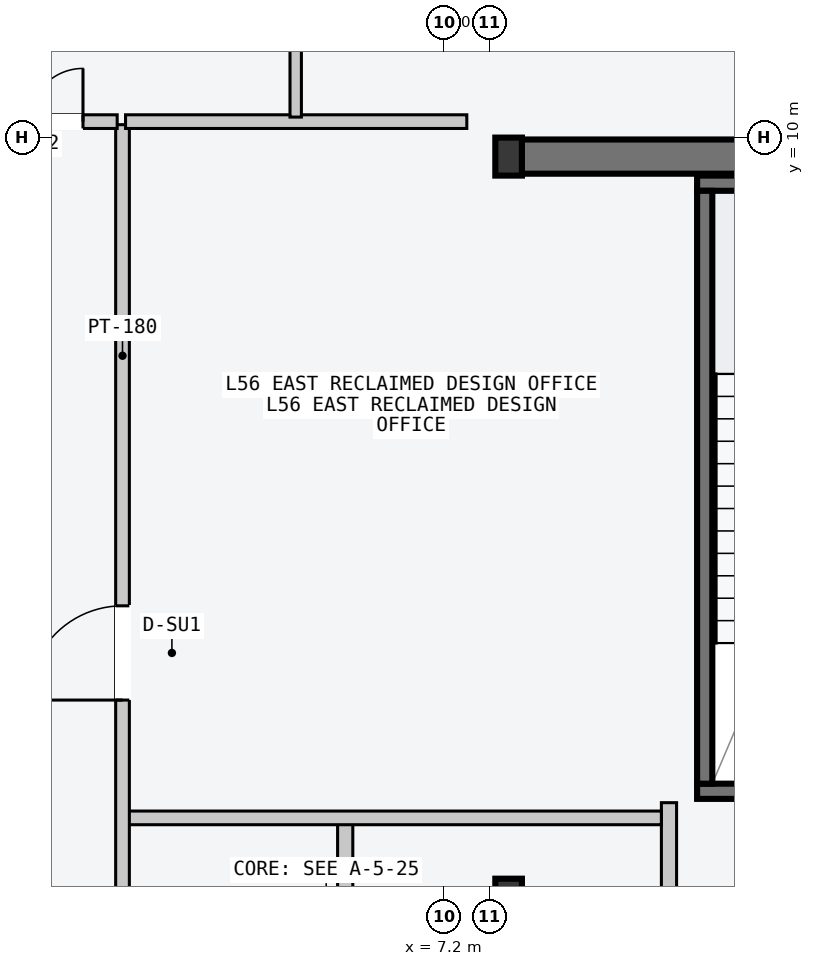
"""IFC4 building model, lengths in metres.
Left out: names, types, materials, properties, quantities, classifications, styles, units other than length and angle.
Written with IfcOpenShell. Run it as: python <this file> out.ifc"""

import sys

from ifc_helpers import new_model, si_unit, direction, frame, frame_2d, origin, origin_2d, place, context, subcontext, project, spatial, rectangle, i_section, extrude, element, fill, save


model = new_model("IFC4")
c1 = context("Model", 3, precision=1e-05, world=origin(), true_north=direction((0.0, 1.0)))
c2 = subcontext(c1, "Body", "Model", "MODEL_VIEW")
j1 = project(units=[si_unit("LENGTHUNIT", "METRE"), si_unit("PLANEANGLEUNIT", "RADIAN")], contexts=[c1])
p1 = place(None, origin())
s1 = spatial("IfcSite", under=j1, at=p1, CompositionType="ELEMENT")
p2 = place(p1, origin())
s2 = spatial("IfcBuilding", under=s1, at=p2, CompositionType="ELEMENT")
p3 = place(p2, frame((0.0, 0.0, 213.9)))
s3 = spatial("IfcBuildingStorey", under=s2, at=p3, CompositionType="ELEMENT", Elevation=213.9)
p4 = place(p3, frame((8.07, 9.75, -0.2), z_axis=(0.0, 0.0, 1.0), x_axis=(1.0, 0.0, 0.0)))
e1 = element("IfcWall", 1, at=p4, inside=s3, PredefinedType="SHEAR", context=c2, shape_type="SweptSolid", body=[
    extrude(rectangle(XDim=6.46, YDim=0.45, at=frame_2d((3.23, 0.0))), origin(), (0.0, 0.0, 1.0), 4.5),
])
p5 = place(p3, frame((10.53, 1.4, -0.2), z_axis=(0.0, 0.0, 1.0), x_axis=(1.0, 0.0, 0.0)))
e2 = element("IfcWall", 2, at=p5, inside=s3, PredefinedType="SOLIDWALL", context=c2, shape_type="SweptSolid", body=[
    extrude(rectangle(XDim=3.72, YDim=0.2, at=frame_2d((1.86, 0.0))), origin(), (0.0, 0.0, 1.0), 4.5),
])
p6 = place(p5, frame((1.5, 0.0, 0.2)))
e3 = element("IfcOpeningElement", 3, at=p6, cuts=e2, PredefinedType="OPENING", context=c2, shape_type="SweptSolid", body=[
    extrude(rectangle(XDim=1.12, YDim=2.18, at=frame_2d((0.56, 1.09))), frame((0.0, 0.11, 0.0), z_axis=(0.0, -1.0, 0.0), x_axis=(1.0, 0.0, 0.0)), (0.0, 0.0, 1.0), 0.22),
])
p7 = place(p3, frame((10.53, 9.4, -0.2), z_axis=(0.0, 0.0, 1.0), x_axis=(1.0, 0.0, 0.0)))
e4 = element("IfcWall", 4, at=p7, inside=s3, PredefinedType="SOLIDWALL", context=c2, shape_type="SweptSolid", body=[
    extrude(rectangle(XDim=3.72, YDim=0.2, at=frame_2d((1.86, 0.0))), origin(), (0.0, 0.0, 1.0), 4.5),
])
p8 = place(p3, frame((10.63, 1.5, -0.2), z_axis=(0.0, 0.0, 1.0), x_axis=(0.0, 1.0, 0.0)))
e5 = element("IfcWall", 5, at=p8, inside=s3, PredefinedType="SOLIDWALL", context=c2, shape_type="SweptSolid", body=[
    extrude(rectangle(XDim=7.8, YDim=0.2, at=frame_2d((3.9, 0.0))), origin(), (0.0, 0.0, 1.0), 4.5),
])
for number, where, z_axis, x_axis in (
    (6, (8.05, 0.0, 0.0), (0.0, 0.0, 1.0), (1.0, 0.0, 0.0)),
    (7, (8.05, 9.75, 0.0), (0.0, 0.0, 1.0), (1.0, 0.0, 0.0)),
):
    element("IfcColumn", number, at=place(p3, frame(where, z_axis=z_axis, x_axis=x_axis)), inside=s3, PredefinedType="COLUMN", context=c2, shape_type="SweptSolid", body=[
        extrude(i_section(OverallWidth=0.35, OverallDepth=0.5, WebThickness=0.02, FlangeThickness=0.032, at=origin_2d()), origin(), (0.0, 0.0, 1.0), 4.5),
    ])
p9 = place(p3, frame((5.9, -9.45, 0.0), z_axis=(0.0, 0.0, 1.0), x_axis=(0.0, 1.0, 0.0)))
e8 = element("IfcWall", 8, at=p9, inside=s3, PredefinedType="PARTITIONING", context=c2, shape_type="SweptSolid", body=[
    extrude(rectangle(XDim=10.5, YDim=0.2, at=frame_2d((5.25, 0.0))), origin(), (0.0, 0.0, 1.0), 4.3),
])
p10 = place(p9, frame((3.9, 0.0, 0.0)))
e9 = element("IfcOpeningElement", 9, at=p10, cuts=e8, PredefinedType="OPENING", context=c2, shape_type="SweptSolid", body=[
    extrude(rectangle(XDim=1.5, YDim=2.2, at=frame_2d((0.75, 1.1))), frame((0.0, 0.11, 0.0), z_axis=(0.0, -1.0, 0.0), x_axis=(1.0, 0.0, 0.0)), (0.0, 0.0, 1.0), 0.22),
])
p11 = place(p3, frame((10.16, -2.55, 0.0), z_axis=(0.0, 0.0, 1.0), x_axis=(0.0, 1.0, 0.0)))
e10 = element("IfcWall", 10, at=p11, inside=s3, PredefinedType="PARTITIONING", context=c2, shape_type="SweptSolid", body=[
    extrude(rectangle(XDim=3.8, YDim=0.2, at=frame_2d((1.9, 0.0))), origin(), (0.0, 0.0, 1.0), 4.3),
])
p12 = place(p11, frame((1.3, 0.0, 0.0)))
e11 = element("IfcOpeningElement", 11, at=p12, cuts=e10, PredefinedType="OPENING", context=c2, shape_type="SweptSolid", body=[
    extrude(rectangle(XDim=1.1, YDim=2.15, at=frame_2d((0.55, 1.075))), frame((0.0, 0.11, 0.0), z_axis=(0.0, -1.0, 0.0), x_axis=(1.0, 0.0, 0.0)), (0.0, 0.0, 1.0), 0.22),
])
p13 = place(p3, frame((3.01, 1.05, 0.0), z_axis=(0.0, 0.0, 1.0), x_axis=(1.0, 0.0, 0.0)))
e12 = element("IfcWall", 12, at=p13, inside=s3, PredefinedType="PARTITIONING", context=c2, shape_type="SweptSolid", body=[
    extrude(rectangle(XDim=7.05, YDim=0.18, at=frame_2d((3.525, 0.0))), origin(), (0.0, 0.0, 1.0), 4.3),
])
p14 = place(p3, frame((2.97, -3.5, 0.0), z_axis=(0.0, 0.0, 1.0), x_axis=(0.0, 1.0, 0.0)))
e13 = element("IfcWall", 13, at=p14, inside=s3, PredefinedType="PARTITIONING", context=c2, shape_type="SweptSolid", body=[
    extrude(rectangle(XDim=13.67, YDim=0.18, at=frame_2d((6.835, 0.0))), origin(), (0.0, 0.0, 1.0), 4.3),
])
p15 = place(p14, frame((6.1, 0.0, 0.0)))
e14 = element("IfcOpeningElement", 14, at=p15, cuts=e13, PredefinedType="OPENING", context=c2, shape_type="SweptSolid", body=[
    extrude(rectangle(XDim=1.24, YDim=2.24, at=frame_2d((0.62, 1.12))), frame((0.0, 0.1, 0.0), z_axis=(0.0, -1.0, 0.0), x_axis=(1.0, 0.0, 0.0)), (0.0, 0.0, 1.0), 0.2),
])
p16 = place(p14, frame((1.6, 0.0, 0.0)))
e15 = element("IfcOpeningElement", 15, at=p16, cuts=e13, PredefinedType="OPENING", context=c2, shape_type="SweptSolid", body=[
    extrude(rectangle(XDim=0.96, YDim=2.18, at=frame_2d((0.48, 1.09))), frame((0.0, 0.1, 0.0), z_axis=(0.0, -1.0, 0.0), x_axis=(1.0, 0.0, 0.0)), (0.0, 0.0, 1.0), 0.2),
])
p17 = place(p3, frame((3.01, 10.21, 0.0), z_axis=(0.0, 0.0, 1.0), x_axis=(1.0, 0.0, 0.0)))
e16 = element("IfcWall", 16, at=p17, inside=s3, PredefinedType="PARTITIONING", context=c2, shape_type="SweptSolid", body=[
    extrude(rectangle(XDim=4.49, YDim=0.18, at=frame_2d((2.245, 0.0))), origin(), (0.0, 0.0, 1.0), 4.3),
])
p18 = place(p3, frame((5.249, 10.27, 0.0), z_axis=(0.0, 0.0, 1.0), x_axis=(0.0, 1.0, 0.0)))
e17 = element("IfcWall", 17, at=p18, inside=s3, PredefinedType="PARTITIONING", context=c2, shape_type="SweptSolid", body=[
    extrude(rectangle(XDim=7.29, YDim=0.15, at=frame_2d((3.645, 0.0))), origin(), (0.0, 0.0, 1.0), 4.3),
])
p19 = place(p18, frame((1.15, 0.0, 0.0)))
e18 = element("IfcOpeningElement", 18, at=p19, cuts=e17, PredefinedType="OPENING", context=c2, shape_type="SweptSolid", body=[
    extrude(rectangle(XDim=0.96, YDim=2.18, at=frame_2d((0.48, 1.09))), frame((0.0, 0.085, 0.0), z_axis=(0.0, -1.0, 0.0), x_axis=(1.0, 0.0, 0.0)), (0.0, 0.0, 1.0), 0.17),
])
p20 = place(p3, frame((0.6, 10.21, 0.0), z_axis=(0.0, 0.0, 1.0), x_axis=(1.0, 0.0, 0.0)))
e19 = element("IfcWall", 19, at=p20, inside=s3, PredefinedType="PARTITIONING", context=c2, shape_type="SweptSolid", body=[
    extrude(rectangle(XDim=2.3, YDim=0.18, at=frame_2d((1.15, 0.0))), origin(), (0.0, 0.0, 1.0), 4.3),
])
p21 = place(p20, frame((0.45, 0.0, 0.0)))
e20 = element("IfcOpeningElement", 20, at=p21, cuts=e19, PredefinedType="OPENING", context=c2, shape_type="SweptSolid", body=[
    extrude(rectangle(XDim=1.4, YDim=2.2, at=frame_2d((0.7, 1.1))), frame((0.0, 0.1, 0.0), z_axis=(0.0, -1.0, 0.0), x_axis=(1.0, 0.0, 0.0)), (0.0, 0.0, 1.0), 0.2),
])
p22 = place(p15, origin())
e21 = element("IfcDoor", 21, at=p22, inside=s3, OperationType="SINGLE_SWING_LEFT", PredefinedType="DOOR", context=c2, shape_type="SweptSolid", body=[
    extrude(rectangle(XDim=1.24, YDim=2.24, at=frame_2d((0.62, 1.12))), frame((0.0, 0.025, 0.0), z_axis=(0.0, -1.0, 0.0), x_axis=(1.0, 0.0, 0.0)), (0.0, 0.0, 1.0), 0.05),
])
fill(e14, e21)
p23 = place(p21, origin())
e22 = element("IfcDoor", 22, at=p23, inside=s3, OperationType="DOUBLE_DOOR_SINGLE_SWING", PredefinedType="DOOR", context=c2, shape_type="SweptSolid", body=[
    extrude(rectangle(XDim=1.4, YDim=2.2, at=frame_2d((0.7, 1.1))), frame((0.0, 0.025, 0.0), z_axis=(0.0, -1.0, 0.0), x_axis=(1.0, 0.0, 0.0)), (0.0, 0.0, 1.0), 0.05),
])
fill(e20, e22)
save(model, sys.argv[1])
